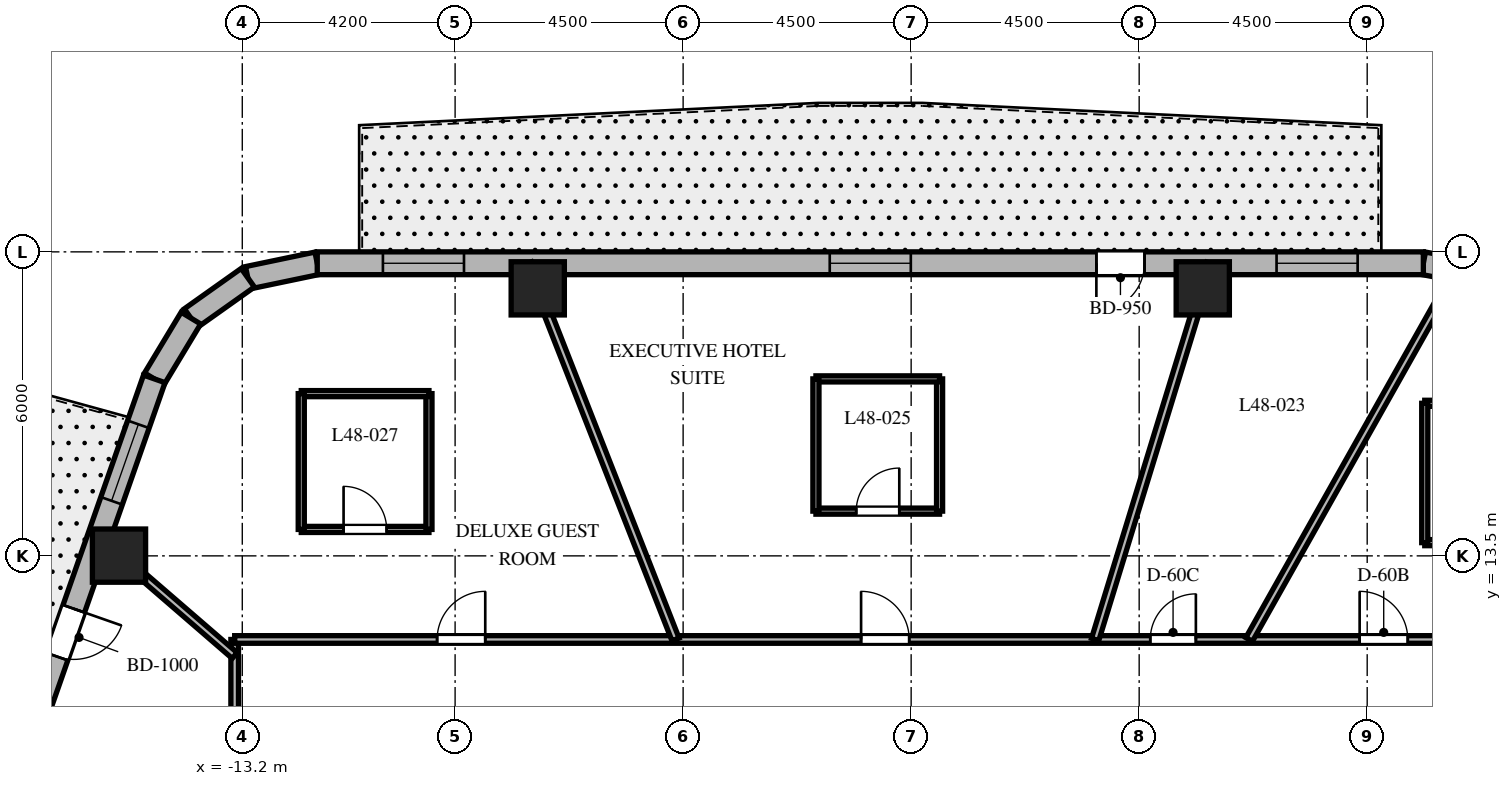
"""IFC4 building model, lengths in metres.
Left out: names, types, materials, properties, quantities, classifications, styles, units other than length and angle.
Written with IfcOpenShell. Run it as: python <this file> out.ifc"""

import sys

from ifc_helpers import new_model, si_unit, direction, frame, frame_2d, origin, origin_2d, place, context, subcontext, project, spatial, rectangle, extrude, element, fill, save


model = new_model("IFC4")
c1 = context("Model", 3, precision=1e-05, world=origin(), true_north=direction((0.0, 1.0)))
c2 = subcontext(c1, "Body", "Model", "MODEL_VIEW")
j1 = project(units=[si_unit("LENGTHUNIT", "METRE"), si_unit("PLANEANGLEUNIT", "RADIAN")], contexts=[c1])
p1 = place(None, origin())
s1 = spatial("IfcSite", under=j1, at=p1, CompositionType="ELEMENT")
p2 = place(p1, origin())
s2 = spatial("IfcBuilding", under=s1, at=p2, CompositionType="ELEMENT")
p3 = place(p2, frame((0.0, 0.0, 194.1)))
s3 = spatial("IfcBuildingStorey", under=s2, at=p3, CompositionType="ELEMENT", Elevation=194.1)
for number, where, z_axis, x_axis in (
    (1, (5.755, 18.78, 0.0), (0.0, 0.0, 1.0), (1.0, 0.0, 0.0)),
    (2, (-7.369, 18.78, 0.0), (0.0, 0.0, 1.0), (1.0, 0.0, 0.0)),
    (3, (-15.633, 13.505, 0.0), (0.0, 0.0, 1.0), (1.0, 0.0, 0.0)),
):
    element("IfcColumn", number, at=place(p3, frame(where, z_axis=z_axis, x_axis=x_axis)), inside=s3, PredefinedType="COLUMN", context=c2, shape_type="SweptSolid", body=[
        extrude(rectangle(XDim=1.05, YDim=1.05, at=origin_2d()), origin(), (0.0, 0.0, 1.0), 3.7),
    ])
p4 = place(p3, frame((11.349, 19.043, 0.0), z_axis=(0.0, 0.0, 1.0), x_axis=(-0.982931267051, 0.183973161772, 0.0)))
e4 = element("IfcWall", 4, at=p4, inside=s3, PredefinedType="SOLIDWALL", context=c2, shape_type="SweptSolid", body=[
    extrude(rectangle(XDim=1.262, YDim=0.45, at=frame_2d((0.631, 0.0))), origin(), (0.0, 0.0, 1.0), 3.4),
])
p5 = place(p3, frame((-11.72, 19.275, 0.0), z_axis=(0.0, 0.0, 1.0), x_axis=(-0.97893106758, -0.204191001093, 0.0)))
e5 = element("IfcWall", 5, at=p5, inside=s3, PredefinedType="SOLIDWALL", context=c2, shape_type="SweptSolid", body=[
    extrude(rectangle(XDim=1.4, YDim=0.45, at=frame_2d((0.7, 0.0))), origin(), (0.0, 0.0, 1.0), 3.4),
])
p6 = place(p3, frame((-13.091, 18.989, 0.0), z_axis=(0.0, 0.0, 1.0), x_axis=(-0.815574637848, -0.578651890258, 0.0)))
e6 = element("IfcWall", 6, at=p6, inside=s3, PredefinedType="SOLIDWALL", context=c2, shape_type="SweptSolid", body=[
    extrude(rectangle(XDim=1.377, YDim=0.45, at=frame_2d((0.688, 0.0))), origin(), (0.0, 0.0, 1.0), 3.4),
])
p7 = place(p3, frame((-14.214, 18.192, 0.0), z_axis=(0.0, 0.0, 1.0), x_axis=(-0.516340945502, -0.856383108193, 0.0)))
e7 = element("IfcWall", 7, at=p7, inside=s3, PredefinedType="SOLIDWALL", context=c2, shape_type="SweptSolid", body=[
    extrude(rectangle(XDim=1.4, YDim=0.45, at=frame_2d((0.7, 0.0))), origin(), (0.0, 0.0, 1.0), 3.4),
])
p8 = place(p3, frame((10.108, 19.275, 0.0), z_axis=(0.0, 0.0, 1.0), x_axis=(-1.0, 0.0, 0.0)))
e8 = element("IfcWall", 8, at=p8, inside=s3, PredefinedType="SOLIDWALL", context=c2, shape_type="SweptSolid", body=[
    extrude(rectangle(XDim=21.829, YDim=0.45, at=frame_2d((10.915, 0.0))), origin(), (0.0, 0.0, 1.0), 3.4),
])
p9 = place(p8, frame((5.503, 0.0, 0.0)))
e9 = element("IfcOpeningElement", 9, at=p9, cuts=e8, PredefinedType="OPENING", context=c2, shape_type="SweptSolid", body=[
    extrude(rectangle(XDim=0.95, YDim=2.15, at=frame_2d((0.475, 1.075))), frame((0.0, 0.235, 0.0), z_axis=(0.0, -1.0, 0.0), x_axis=(1.0, 0.0, 0.0)), (0.0, 0.0, 1.0), 0.47),
])
p10 = place(p8, frame((1.297, 0.0, 0.8)))
e10 = element("IfcOpeningElement", 10, at=p10, cuts=e8, PredefinedType="OPENING", context=c2, shape_type="SweptSolid", body=[
    extrude(rectangle(XDim=1.6, YDim=1.75, at=frame_2d((0.8, 0.875))), frame((0.0, 0.235, 0.0), z_axis=(0.0, -1.0, 0.0), x_axis=(1.0, 0.0, 0.0)), (0.0, 0.0, 1.0), 0.47),
])
p11 = place(p8, frame((10.115, 0.0, 0.8)))
e11 = element("IfcOpeningElement", 11, at=p11, cuts=e8, PredefinedType="OPENING", context=c2, shape_type="SweptSolid", body=[
    extrude(rectangle(XDim=1.6, YDim=1.75, at=frame_2d((0.8, 0.875))), frame((0.0, 0.235, 0.0), z_axis=(0.0, -1.0, 0.0), x_axis=(1.0, 0.0, 0.0)), (0.0, 0.0, 1.0), 0.47),
])
p12 = place(p8, frame((18.933, 0.0, 0.8)))
e12 = element("IfcOpeningElement", 12, at=p12, cuts=e8, PredefinedType="OPENING", context=c2, shape_type="SweptSolid", body=[
    extrude(rectangle(XDim=1.6, YDim=1.75, at=frame_2d((0.8, 0.875))), frame((0.0, 0.235, 0.0), z_axis=(0.0, -1.0, 0.0), x_axis=(1.0, 0.0, 0.0)), (0.0, 0.0, 1.0), 0.47),
])
p13 = place(p3, frame((-14.937, 16.993, 0.0), z_axis=(0.0, 0.0, 1.0), x_axis=(-0.330431575061, -0.943829949834, 0.0)))
e13 = element("IfcWall", 13, at=p13, inside=s3, PredefinedType="SOLIDWALL", context=c2, shape_type="SweptSolid", body=[
    extrude(rectangle(XDim=17.689, YDim=0.45, at=frame_2d((8.844, 0.0))), origin(), (0.0, 0.0, 1.0), 3.4),
])
p14 = place(p13, frame((4.807, 0.0, 0.0)))
e14 = element("IfcOpeningElement", 14, at=p14, cuts=e13, PredefinedType="OPENING", context=c2, shape_type="SweptSolid", body=[
    extrude(rectangle(XDim=1.0, YDim=2.15, at=frame_2d((0.5, 1.075))), frame((0.0, 0.235, 0.0), z_axis=(0.0, -1.0, 0.0), x_axis=(1.0, 0.0, 0.0)), (0.0, 0.0, 1.0), 0.47),
])
p15 = place(p13, frame((0.95, 0.0, 0.8)))
e15 = element("IfcOpeningElement", 15, at=p15, cuts=e13, PredefinedType="OPENING", context=c2, shape_type="SweptSolid", body=[
    extrude(rectangle(XDim=1.6, YDim=1.75, at=frame_2d((0.8, 0.875))), frame((0.0, 0.235, 0.0), z_axis=(0.0, -1.0, 0.0), x_axis=(1.0, 0.0, 0.0)), (0.0, 0.0, 1.0), 0.47),
])
p16 = place(p13, frame((6.623, 0.0, 0.8)))
e16 = element("IfcOpeningElement", 16, at=p16, cuts=e13, PredefinedType="OPENING", context=c2, shape_type="SweptSolid", body=[
    extrude(rectangle(XDim=1.6, YDim=1.75, at=frame_2d((0.8, 0.875))), frame((0.0, 0.235, 0.0), z_axis=(0.0, -1.0, 0.0), x_axis=(1.0, 0.0, 0.0)), (0.0, 0.0, 1.0), 0.47),
])
p17 = place(p13, frame((10.849, 0.0, 0.8)))
e17 = element("IfcOpeningElement", 17, at=p17, cuts=e13, PredefinedType="OPENING", context=c2, shape_type="SweptSolid", body=[
    extrude(rectangle(XDim=1.6, YDim=1.75, at=frame_2d((0.8, 0.875))), frame((0.0, 0.235, 0.0), z_axis=(0.0, -1.0, 0.0), x_axis=(1.0, 0.0, 0.0)), (0.0, 0.0, 1.0), 0.47),
])
p18 = place(p13, frame((15.084, 0.0, 0.8)))
e18 = element("IfcOpeningElement", 18, at=p18, cuts=e13, PredefinedType="OPENING", context=c2, shape_type="SweptSolid", body=[
    extrude(rectangle(XDim=1.6, YDim=1.75, at=frame_2d((0.8, 0.875))), frame((0.0, 0.235, 0.0), z_axis=(0.0, -1.0, 0.0), x_axis=(1.0, 0.0, 0.0)), (0.0, 0.0, 1.0), 0.47),
])
p19 = place(p3, frame((-13.35, -11.85, 0.0), z_axis=(0.0, 0.0, 1.0), x_axis=(0.0, 1.0, 0.0)))
e19 = element("IfcWall", 19, at=p19, inside=s3, PredefinedType="PARTITIONING", context=c2, shape_type="SweptSolid", body=[
    extrude(rectangle(XDim=23.7, YDim=0.15, at=frame_2d((11.85, 0.0))), origin(), (0.0, 0.0, 1.0), 2.84),
])
p20 = place(p19, frame((20.136, 0.0, 0.0)))
e20 = element("IfcOpeningElement", 20, at=p20, cuts=e19, PredefinedType="OPENING", context=c2, shape_type="SweptSolid", body=[
    extrude(rectangle(XDim=0.9, YDim=2.03, at=frame_2d((0.45, 1.015))), frame((0.0, 0.085, 0.0), z_axis=(0.0, -1.0, 0.0), x_axis=(1.0, 0.0, 0.0)), (0.0, 0.0, 1.0), 0.17),
])
p21 = place(p19, frame((15.551, 0.0, 0.0)))
e21 = element("IfcOpeningElement", 21, at=p21, cuts=e19, PredefinedType="OPENING", context=c2, shape_type="SweptSolid", body=[
    extrude(rectangle(XDim=0.9, YDim=2.03, at=frame_2d((0.45, 1.015))), frame((0.0, 0.085, 0.0), z_axis=(0.0, -1.0, 0.0), x_axis=(1.0, 0.0, 0.0)), (0.0, 0.0, 1.0), 0.17),
])
p22 = place(p19, frame((10.751, 0.0, 0.0)))
e22 = element("IfcOpeningElement", 22, at=p22, cuts=e19, PredefinedType="OPENING", context=c2, shape_type="SweptSolid", body=[
    extrude(rectangle(XDim=0.95, YDim=2.03, at=frame_2d((0.475, 1.015))), frame((0.0, 0.085, 0.0), z_axis=(0.0, -1.0, 0.0), x_axis=(1.0, 0.0, 0.0)), (0.0, 0.0, 1.0), 0.17),
])
p23 = place(p19, frame((5.677, 0.0, 0.0)))
e23 = element("IfcOpeningElement", 23, at=p23, cuts=e19, PredefinedType="OPENING", context=c2, shape_type="SweptSolid", body=[
    extrude(rectangle(XDim=0.9, YDim=2.03, at=frame_2d((0.45, 1.015))), frame((0.0, 0.085, 0.0), z_axis=(0.0, -1.0, 0.0), x_axis=(1.0, 0.0, 0.0)), (0.0, 0.0, 1.0), 0.17),
])
p24 = place(p19, frame((1.721, 0.0, 0.0)))
e24 = element("IfcOpeningElement", 24, at=p24, cuts=e19, PredefinedType="OPENING", context=c2, shape_type="SweptSolid", body=[
    extrude(rectangle(XDim=0.9, YDim=2.03, at=frame_2d((0.45, 1.015))), frame((0.0, 0.085, 0.0), z_axis=(0.0, -1.0, 0.0), x_axis=(1.0, 0.0, 0.0)), (0.0, 0.0, 1.0), 0.17),
])
p25 = place(p3, frame((-13.35, 11.85, 0.0), z_axis=(0.0, 0.0, 1.0), x_axis=(1.0, 0.0, 0.0)))
e25 = element("IfcWall", 25, at=p25, inside=s3, PredefinedType="PARTITIONING", context=c2, shape_type="SweptSolid", body=[
    extrude(rectangle(XDim=26.7, YDim=0.15, at=frame_2d((13.35, 0.0))), origin(), (0.0, 0.0, 1.0), 2.84),
])
p26 = place(p25, frame((22.201, 0.0, 0.0)))
e26 = element("IfcOpeningElement", 26, at=p26, cuts=e25, PredefinedType="OPENING", context=c2, shape_type="SweptSolid", body=[
    extrude(rectangle(XDim=0.95, YDim=2.03, at=frame_2d((0.475, 1.015))), frame((0.0, 0.085, 0.0), z_axis=(0.0, -1.0, 0.0), x_axis=(1.0, 0.0, 0.0)), (0.0, 0.0, 1.0), 0.17),
])
p27 = place(p25, frame((18.069, 0.0, 0.0)))
e27 = element("IfcOpeningElement", 27, at=p27, cuts=e25, PredefinedType="OPENING", context=c2, shape_type="SweptSolid", body=[
    extrude(rectangle(XDim=0.9, YDim=2.03, at=frame_2d((0.45, 1.015))), frame((0.0, 0.085, 0.0), z_axis=(0.0, -1.0, 0.0), x_axis=(1.0, 0.0, 0.0)), (0.0, 0.0, 1.0), 0.17),
])
p28 = place(p25, frame((12.362, 0.0, 0.0)))
e28 = element("IfcOpeningElement", 28, at=p28, cuts=e25, PredefinedType="OPENING", context=c2, shape_type="SweptSolid", body=[
    extrude(rectangle(XDim=0.95, YDim=2.03, at=frame_2d((0.475, 1.015))), frame((0.0, 0.085, 0.0), z_axis=(0.0, -1.0, 0.0), x_axis=(1.0, 0.0, 0.0)), (0.0, 0.0, 1.0), 0.17),
])
p29 = place(p25, frame((3.995, 0.0, 0.0)))
e29 = element("IfcOpeningElement", 29, at=p29, cuts=e25, PredefinedType="OPENING", context=c2, shape_type="SweptSolid", body=[
    extrude(rectangle(XDim=0.95, YDim=2.03, at=frame_2d((0.475, 1.015))), frame((0.0, 0.085, 0.0), z_axis=(0.0, -1.0, 0.0), x_axis=(1.0, 0.0, 0.0)), (0.0, 0.0, 1.0), 0.17),
])
p30 = place(p3, frame((6.67, 11.85, 0.0), z_axis=(0.0, 0.0, 1.0), x_axis=(0.490522493943, 0.871428530022, 0.0)))
e30 = element("IfcWall", 30, at=p30, inside=s3, PredefinedType="PARTITIONING", context=c2, shape_type="SweptSolid", body=[
    extrude(rectangle(XDim=8.207, YDim=0.15, at=frame_2d((4.104, 0.0))), origin(), (0.0, 0.0, 1.0), 2.64),
])
p31 = place(p3, frame((3.631, 11.85, 0.0), z_axis=(0.0, 0.0, 1.0), x_axis=(0.293007573338, 0.956110120209, 0.0)))
e31 = element("IfcWall", 31, at=p31, inside=s3, PredefinedType="PARTITIONING", context=c2, shape_type="SweptSolid", body=[
    extrude(rectangle(XDim=7.766, YDim=0.15, at=frame_2d((3.883, 0.0))), origin(), (0.0, 0.0, 1.0), 2.64),
])
p32 = place(p3, frame((-4.65, 11.85, 0.0), z_axis=(0.0, 0.0, 1.0), x_axis=(-0.365265947993, 0.930903210456, 0.0)))
e32 = element("IfcWall", 32, at=p32, inside=s3, PredefinedType="PARTITIONING", context=c2, shape_type="SweptSolid", body=[
    extrude(rectangle(XDim=7.976, YDim=0.15, at=frame_2d((3.988, 0.0))), origin(), (0.0, 0.0, 1.0), 2.64),
])
p33 = place(p3, frame((-13.35, 11.533, 0.0), z_axis=(0.0, 0.0, 1.0), x_axis=(-0.756711647314, 0.65374879183, 0.0)))
e33 = element("IfcWall", 33, at=p33, inside=s3, PredefinedType="PARTITIONING", context=c2, shape_type="SweptSolid", body=[
    extrude(rectangle(XDim=3.55, YDim=0.15, at=frame_2d((1.775, 0.0))), origin(), (0.0, 0.0, 1.0), 2.64),
])
p34 = place(p3, frame((10.136, 13.761, 0.0), z_axis=(0.0, 0.0, 1.0), x_axis=(1.0, 0.0, 0.0)))
e34 = element("IfcWall", 34, at=p34, inside=s3, PredefinedType="PARTITIONING", context=c2, shape_type="SweptSolid", body=[
    extrude(rectangle(XDim=2.6, YDim=0.12, at=frame_2d((1.3, 0.0))), origin(), (0.0, 0.0, 1.0), 3.4),
])
p35 = place(p34, frame((0.875, 0.0, 0.0)))
e35 = element("IfcOpeningElement", 35, at=p35, cuts=e34, PredefinedType="OPENING", context=c2, shape_type="SweptSolid", body=[
    extrude(rectangle(XDim=0.85, YDim=2.03, at=frame_2d((0.425, 1.015))), frame((0.0, 0.07, 0.0), z_axis=(0.0, -1.0, 0.0), x_axis=(1.0, 0.0, 0.0)), (0.0, 0.0, 1.0), 0.14),
])
p36 = place(p3, frame((12.736, 16.511, 0.0), z_axis=(0.0, 0.0, 1.0), x_axis=(-1.0, 0.0, 0.0)))
e36 = element("IfcWall", 36, at=p36, inside=s3, PredefinedType="PARTITIONING", context=c2, shape_type="SweptSolid", body=[
    extrude(rectangle(XDim=2.6, YDim=0.12, at=frame_2d((1.3, 0.0))), origin(), (0.0, 0.0, 1.0), 2.64),
])
p37 = place(p3, frame((10.136, 16.511, 0.0), z_axis=(0.0, 0.0, 1.0), x_axis=(0.0, -1.0, 0.0)))
e37 = element("IfcWall", 37, at=p37, inside=s3, PredefinedType="PARTITIONING", context=c2, shape_type="SweptSolid", body=[
    extrude(rectangle(XDim=2.75, YDim=0.12, at=frame_2d((1.375, 0.0))), origin(), (0.0, 0.0, 1.0), 2.64),
])
p38 = place(p3, frame((-1.879, 14.383, 0.0), z_axis=(0.0, 0.0, 1.0), x_axis=(1.0, 0.0, 0.0)))
e38 = element("IfcWall", 38, at=p38, inside=s3, PredefinedType="PARTITIONING", context=c2, shape_type="SweptSolid", body=[
    extrude(rectangle(XDim=2.44, YDim=0.12, at=frame_2d((1.22, 0.0))), origin(), (0.0, 0.0, 1.0), 3.4),
])
p39 = place(p38, frame((0.795, 0.0, 0.0)))
e39 = element("IfcOpeningElement", 39, at=p39, cuts=e38, PredefinedType="OPENING", context=c2, shape_type="SweptSolid", body=[
    extrude(rectangle(XDim=0.85, YDim=2.03, at=frame_2d((0.425, 1.015))), frame((0.0, 0.07, 0.0), z_axis=(0.0, -1.0, 0.0), x_axis=(1.0, 0.0, 0.0)), (0.0, 0.0, 1.0), 0.14),
])
p40 = place(p3, frame((0.561, 14.383, 0.0), z_axis=(0.0, 0.0, 1.0), x_axis=(0.0, 1.0, 0.0)))
e40 = element("IfcWall", 40, at=p40, inside=s3, PredefinedType="PARTITIONING", context=c2, shape_type="SweptSolid", body=[
    extrude(rectangle(XDim=2.61, YDim=0.12, at=frame_2d((1.305, 0.0))), origin(), (0.0, 0.0, 1.0), 2.84),
])
p41 = place(p3, frame((0.561, 16.993, 0.0), z_axis=(0.0, 0.0, 1.0), x_axis=(-1.0, 0.0, 0.0)))
e41 = element("IfcWall", 41, at=p41, inside=s3, PredefinedType="PARTITIONING", context=c2, shape_type="SweptSolid", body=[
    extrude(rectangle(XDim=2.44, YDim=0.12, at=frame_2d((1.22, 0.0))), origin(), (0.0, 0.0, 1.0), 3.4),
])
p42 = place(p3, frame((-1.879, 16.993, 0.0), z_axis=(0.0, 0.0, 1.0), x_axis=(0.0, -1.0, 0.0)))
e42 = element("IfcWall", 42, at=p42, inside=s3, PredefinedType="PARTITIONING", context=c2, shape_type="SweptSolid", body=[
    extrude(rectangle(XDim=2.61, YDim=0.12, at=frame_2d((1.305, 0.0))), origin(), (0.0, 0.0, 1.0), 2.84),
])
p43 = place(p3, frame((-12.036, 14.022, 0.0), z_axis=(0.0, 0.0, 1.0), x_axis=(1.0, 0.0, 0.0)))
e43 = element("IfcWall", 43, at=p43, inside=s3, PredefinedType="PARTITIONING", context=c2, shape_type="SweptSolid", body=[
    extrude(rectangle(XDim=2.52, YDim=0.12, at=frame_2d((1.26, 0.0))), origin(), (0.0, 0.0, 1.0), 2.927),
])
p44 = place(p43, frame((0.835, 0.0, 0.0)))
e44 = element("IfcOpeningElement", 44, at=p44, cuts=e43, PredefinedType="OPENING", context=c2, shape_type="SweptSolid", body=[
    extrude(rectangle(XDim=0.85, YDim=2.03, at=frame_2d((0.425, 1.015))), frame((0.0, 0.07, 0.0), z_axis=(0.0, -1.0, 0.0), x_axis=(1.0, 0.0, 0.0)), (0.0, 0.0, 1.0), 0.14),
])
p45 = place(p3, frame((-9.516, 14.022, 0.0), z_axis=(0.0, 0.0, 1.0), x_axis=(0.0, 1.0, 0.0)))
e45 = element("IfcWall", 45, at=p45, inside=s3, PredefinedType="PARTITIONING", context=c2, shape_type="SweptSolid", body=[
    extrude(rectangle(XDim=2.68, YDim=0.12, at=frame_2d((1.34, 0.0))), origin(), (0.0, 0.0, 1.0), 2.927),
])
p46 = place(p3, frame((-9.516, 16.702, 0.0), z_axis=(0.0, 0.0, 1.0), x_axis=(-1.0, 0.0, 0.0)))
e46 = element("IfcWall", 46, at=p46, inside=s3, PredefinedType="PARTITIONING", context=c2, shape_type="SweptSolid", body=[
    extrude(rectangle(XDim=2.52, YDim=0.12, at=frame_2d((1.26, 0.0))), origin(), (0.0, 0.0, 1.0), 2.64),
])
p47 = place(p3, frame((-12.036, 16.702, 0.0), z_axis=(0.0, 0.0, 1.0), x_axis=(0.0, -1.0, 0.0)))
e47 = element("IfcWall", 47, at=p47, inside=s3, PredefinedType="PARTITIONING", context=c2, shape_type="SweptSolid", body=[
    extrude(rectangle(XDim=2.68, YDim=0.12, at=frame_2d((1.34, 0.0))), origin(), (0.0, 0.0, 1.0), 2.64),
])
p48 = place(p9, origin())
e48 = element("IfcDoor", 48, at=p48, inside=s3, OperationType="SINGLE_SWING_RIGHT", PredefinedType="DOOR", context=c2, shape_type="SweptSolid", body=[
    extrude(rectangle(XDim=0.95, YDim=2.15, at=frame_2d((0.475, 1.075))), frame((0.0, 0.025, 0.0), z_axis=(0.0, -1.0, 0.0), x_axis=(1.0, 0.0, 0.0)), (0.0, 0.0, 1.0), 0.05),
])
fill(e9, e48)
p49 = place(p10, origin())
e49 = element("IfcWindow", 49, at=p49, inside=s3, PartitioningType="SINGLE_PANEL", PredefinedType="WINDOW", context=c2, shape_type="SweptSolid", body=[
    extrude(rectangle(XDim=1.6, YDim=1.75, at=frame_2d((0.8, 0.875))), frame((0.0, 0.03, 0.0), z_axis=(0.0, -1.0, 0.0), x_axis=(1.0, 0.0, 0.0)), (0.0, 0.0, 1.0), 0.06),
])
fill(e10, e49)
p50 = place(p11, origin())
e50 = element("IfcWindow", 50, at=p50, inside=s3, PartitioningType="SINGLE_PANEL", PredefinedType="WINDOW", context=c2, shape_type="SweptSolid", body=[
    extrude(rectangle(XDim=1.6, YDim=1.75, at=frame_2d((0.8, 0.875))), frame((0.0, 0.03, 0.0), z_axis=(0.0, -1.0, 0.0), x_axis=(1.0, 0.0, 0.0)), (0.0, 0.0, 1.0), 0.06),
])
fill(e11, e50)
p51 = place(p12, origin())
e51 = element("IfcWindow", 51, at=p51, inside=s3, PartitioningType="SINGLE_PANEL", PredefinedType="WINDOW", context=c2, shape_type="SweptSolid", body=[
    extrude(rectangle(XDim=1.6, YDim=1.75, at=frame_2d((0.8, 0.875))), frame((0.0, 0.03, 0.0), z_axis=(0.0, -1.0, 0.0), x_axis=(1.0, 0.0, 0.0)), (0.0, 0.0, 1.0), 0.06),
])
fill(e12, e51)
p52 = place(p14, origin())
e52 = element("IfcDoor", 52, at=p52, inside=s3, OperationType="SINGLE_SWING_LEFT", PredefinedType="DOOR", context=c2, shape_type="SweptSolid", body=[
    extrude(rectangle(XDim=1.0, YDim=2.15, at=frame_2d((0.5, 1.075))), frame((0.0, 0.025, 0.0), z_axis=(0.0, -1.0, 0.0), x_axis=(1.0, 0.0, 0.0)), (0.0, 0.0, 1.0), 0.05),
])
fill(e14, e52)
p53 = place(p15, origin())
e53 = element("IfcWindow", 53, at=p53, inside=s3, PartitioningType="SINGLE_PANEL", PredefinedType="WINDOW", context=c2, shape_type="SweptSolid", body=[
    extrude(rectangle(XDim=1.6, YDim=1.75, at=frame_2d((0.8, 0.875))), frame((0.0, 0.03, 0.0), z_axis=(0.0, -1.0, 0.0), x_axis=(1.0, 0.0, 0.0)), (0.0, 0.0, 1.0), 0.06),
])
fill(e15, e53)
p54 = place(p26, origin())
e54 = element("IfcDoor", 54, at=p54, inside=s3, OperationType="SINGLE_SWING_LEFT", PredefinedType="DOOR", context=c2, shape_type="SweptSolid", body=[
    extrude(rectangle(XDim=0.95, YDim=2.03, at=frame_2d((0.475, 1.015))), frame((0.0, 0.025, 0.0), z_axis=(0.0, -1.0, 0.0), x_axis=(1.0, 0.0, 0.0)), (0.0, 0.0, 1.0), 0.05),
])
fill(e26, e54)
p55 = place(p27, origin())
e55 = element("IfcDoor", 55, at=p55, inside=s3, OperationType="SINGLE_SWING_RIGHT", PredefinedType="DOOR", context=c2, shape_type="SweptSolid", body=[
    extrude(rectangle(XDim=0.9, YDim=2.03, at=frame_2d((0.45, 1.015))), frame((0.0, 0.025, 0.0), z_axis=(0.0, -1.0, 0.0), x_axis=(1.0, 0.0, 0.0)), (0.0, 0.0, 1.0), 0.05),
])
fill(e27, e55)
p56 = place(p28, origin())
e56 = element("IfcDoor", 56, at=p56, inside=s3, OperationType="SINGLE_SWING_LEFT", PredefinedType="DOOR", context=c2, shape_type="SweptSolid", body=[
    extrude(rectangle(XDim=0.95, YDim=2.03, at=frame_2d((0.475, 1.015))), frame((0.0, 0.025, 0.0), z_axis=(0.0, -1.0, 0.0), x_axis=(1.0, 0.0, 0.0)), (0.0, 0.0, 1.0), 0.05),
])
fill(e28, e56)
p57 = place(p39, origin())
e57 = element("IfcDoor", 57, at=p57, inside=s3, OperationType="SINGLE_SWING_RIGHT", PredefinedType="DOOR", context=c2, shape_type="SweptSolid", body=[
    extrude(rectangle(XDim=0.85, YDim=2.03, at=frame_2d((0.425, 1.015))), frame((0.0, 0.025, 0.0), z_axis=(0.0, -1.0, 0.0), x_axis=(1.0, 0.0, 0.0)), (0.0, 0.0, 1.0), 0.05),
])
fill(e39, e57)
p58 = place(p29, origin())
e58 = element("IfcDoor", 58, at=p58, inside=s3, OperationType="SINGLE_SWING_RIGHT", PredefinedType="DOOR", context=c2, shape_type="SweptSolid", body=[
    extrude(rectangle(XDim=0.95, YDim=2.03, at=frame_2d((0.475, 1.015))), frame((0.0, 0.025, 0.0), z_axis=(0.0, -1.0, 0.0), x_axis=(1.0, 0.0, 0.0)), (0.0, 0.0, 1.0), 0.05),
])
fill(e29, e58)
p59 = place(p44, origin())
e59 = element("IfcDoor", 59, at=p59, inside=s3, OperationType="SINGLE_SWING_LEFT", PredefinedType="DOOR", context=c2, shape_type="SweptSolid", body=[
    extrude(rectangle(XDim=0.85, YDim=2.03, at=frame_2d((0.425, 1.015))), frame((0.0, 0.025, 0.0), z_axis=(0.0, -1.0, 0.0), x_axis=(1.0, 0.0, 0.0)), (0.0, 0.0, 1.0), 0.05),
])
fill(e44, e59)
save(model, sys.argv[1])
